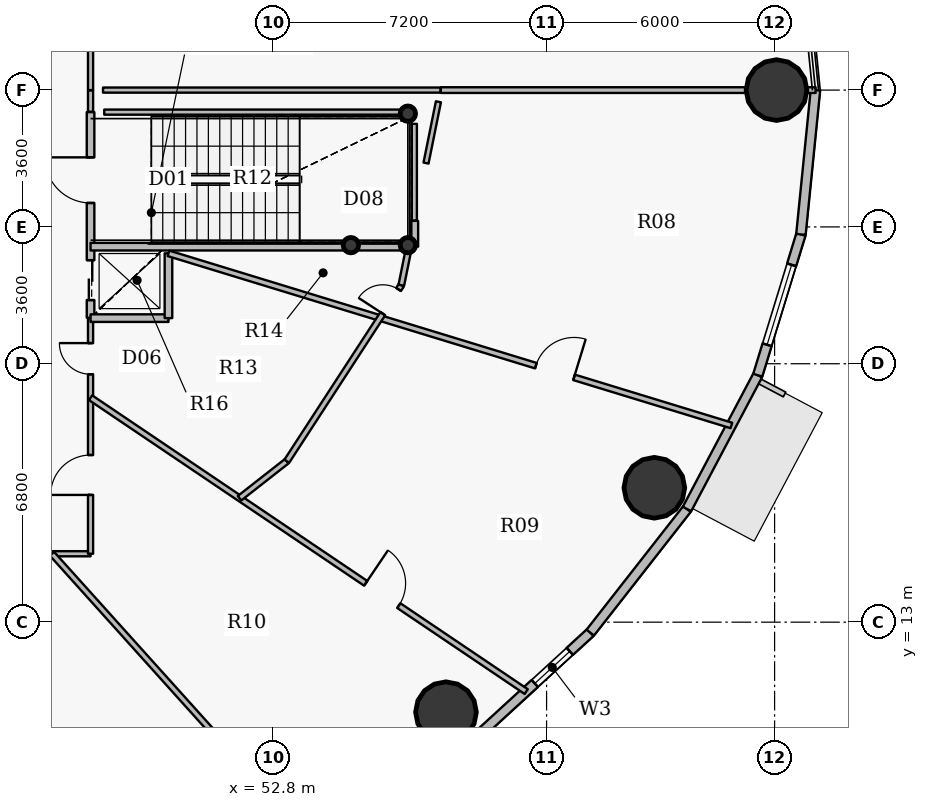
"""IFC4 building model, lengths in metres.
Left out: names, types, materials, properties, quantities, classifications, styles, units other than length and angle.
Written with IfcOpenShell. Run it as: python <this file> out.ifc"""

import sys

from ifc_helpers import new_model, si_unit, direction, frame, frame_2d, origin, origin_2d, place, context, subcontext, project, spatial, rectangle, hollow_circle, extrude, source, transform, mapped, element, fill, save


model = new_model("IFC4")
c1 = context("Model", 3, precision=1e-05, world=origin(), true_north=direction((0.0, 1.0)))
c2 = subcontext(c1, "Body", "Model", "MODEL_VIEW")
j1 = project(units=[si_unit("LENGTHUNIT", "METRE"), si_unit("PLANEANGLEUNIT", "RADIAN")], contexts=[c1])
p1 = place(None, origin())
s1 = spatial("IfcSite", under=j1, at=p1, CompositionType="ELEMENT")
p2 = place(p1, origin())
s2 = spatial("IfcBuilding", under=s1, at=p2, CompositionType="ELEMENT")
p3 = place(p2, frame((0.0, 0.0, 45.0)))
s3 = spatial("IfcBuildingStorey", under=s2, at=p3, CompositionType="ELEMENT", Elevation=45.0)
for number, where, z_axis, x_axis in (
    (1, (56.35, 26.38, 0.0), (0.0, 0.0, 1.0), (1.0, 0.0, 0.0)),
    (2, (56.35, 22.92, 0.0), (0.0, 0.0, 1.0), (1.0, 0.0, 0.0)),
    (3, (54.85, 22.92, 0.0), (0.0, 0.0, 1.0), (1.0, 0.0, 0.0)),
):
    element("IfcColumn", number, at=place(p3, frame(where, z_axis=z_axis, x_axis=x_axis)), inside=s3, PredefinedType="COLUMN", context=c2, shape_type="SweptSolid", body=[
        extrude(hollow_circle(Radius=0.203, WallThickness=0.016, at=origin_2d()), origin(), (0.0, 0.0, 1.0), 4.2),
    ])
for number, where, z_axis, x_axis in (
    (4, (66.05, 27.0, 0.0), (0.0, 0.0, 1.0), (1.0, 0.0, 0.0)),
    (5, (57.353, 10.631, 0.0), (0.0, 0.0, 1.0), (1.0, 0.0, 0.0)),
    (6, (62.835, 16.536, 0.0), (0.0, 0.0, 1.0), (1.0, 0.0, 0.0)),
):
    element("IfcColumn", number, at=place(p3, frame(where, z_axis=z_axis, x_axis=x_axis)), inside=s3, PredefinedType="COLUMN", context=c2, shape_type="SweptSolid", body=[
        extrude(hollow_circle(Radius=0.8, WallThickness=0.045, at=origin_2d()), origin(), (0.0, 0.0, 1.0), 4.2),
    ])
p4 = place(p3, frame((61.15, 12.725, 0.0), z_axis=(0.0, 0.0, 1.0), x_axis=(-0.737116376281, -0.67576582321, 0.0)))
e7 = element("IfcWall", 7, at=p4, inside=s3, PredefinedType="SOLIDWALL", context=c2, shape_type="SweptSolid", body=[
    extrude(rectangle(XDim=4.294, YDim=0.25, at=frame_2d((2.147, 0.0))), origin(), (0.0, 0.0, 1.0), 3.95),
])
p5 = place(p4, frame((0.731, 0.0, 0.9)))
e8 = element("IfcOpeningElement", 8, at=p5, cuts=e7, PredefinedType="OPENING", context=c2, shape_type="SweptSolid", body=[
    extrude(rectangle(XDim=1.25, YDim=1.65, at=origin_2d()), frame((0.625, 0.135, 0.825), z_axis=(0.0, -1.0, 0.0), x_axis=(1.0, 0.0, 0.0)), (0.0, 0.0, 1.0), 0.27),
])
p6 = place(p3, frame((63.695, 15.977, 0.0), z_axis=(0.0, 0.0, 1.0), x_axis=(-0.616295508253, -0.787514981767, 0.0)))
e9 = element("IfcWall", 9, at=p6, inside=s3, PredefinedType="SOLIDWALL", context=c2, shape_type="SweptSolid", body=[
    extrude(rectangle(XDim=4.129, YDim=0.25, at=frame_2d((2.065, 0.0))), origin(), (0.0, 0.0, 1.0), 3.95),
])
p7 = place(p3, frame((65.558, 19.499, 0.0), z_axis=(0.0, 0.0, 1.0), x_axis=(-0.467662443071, -0.883907144072, 0.0)))
e10 = element("IfcWall", 10, at=p7, inside=s3, PredefinedType="SOLIDWALL", context=c2, shape_type="SweptSolid", body=[
    extrude(rectangle(XDim=3.984, YDim=0.25, at=frame_2d((1.992, 0.0))), origin(), (0.0, 0.0, 1.0), 3.95),
])
p8 = place(p3, frame((66.693, 23.203, 0.0), z_axis=(0.0, 0.0, 1.0), x_axis=(-0.293111631758, -0.956078224482, 0.0)))
e11 = element("IfcWall", 11, at=p8, inside=s3, PredefinedType="SOLIDWALL", context=c2, shape_type="SweptSolid", body=[
    extrude(rectangle(XDim=3.875, YDim=0.25, at=frame_2d((1.938, 0.0))), origin(), (0.0, 0.0, 1.0), 3.95),
])
p9 = place(p8, frame((0.837, 0.0, 0.9)))
e12 = element("IfcOpeningElement", 12, at=p9, cuts=e11, PredefinedType="OPENING", context=c2, shape_type="SweptSolid", body=[
    extrude(rectangle(XDim=2.2, YDim=2.0, at=origin_2d()), frame((1.1, 0.135, 1.0), z_axis=(0.0, -1.0, 0.0), x_axis=(1.0, 0.0, 0.0)), (0.0, 0.0, 1.0), 0.27),
])
p10 = place(p3, frame((67.075, 27.0, 0.0), z_axis=(0.0, 0.0, 1.0), x_axis=(-0.099997795174, -0.994987658698, 0.0)))
e13 = element("IfcWall", 13, at=p10, inside=s3, PredefinedType="SOLIDWALL", context=c2, shape_type="SweptSolid", body=[
    extrude(rectangle(XDim=3.816, YDim=0.25, at=frame_2d((1.908, 0.0))), origin(), (0.0, 0.0, 1.0), 3.95),
])
p11 = place(p3, frame((46.05, 14.8, 0.0), z_axis=(0.0, 0.0, 1.0), x_axis=(1.0, 0.0, 0.0)))
e14 = element("IfcWall", 14, at=p11, inside=s3, PredefinedType="PARTITIONING", context=c2, shape_type="SweptSolid", body=[
    extrude(rectangle(XDim=1.95, YDim=0.135, at=frame_2d((0.975, 0.0))), origin(), (0.0, 0.0, 1.0), 3.95),
])
p12 = place(p3, frame((46.985, 14.8, 0.0), z_axis=(0.0, 0.0, 1.0), x_axis=(0.669133664768, -0.743142071662, 0.0)))
e15 = element("IfcWall", 15, at=p12, inside=s3, PredefinedType="PARTITIONING", context=c2, shape_type="SweptSolid", body=[
    extrude(rectangle(XDim=10.299, YDim=0.15, at=frame_2d((5.149, 0.0))), origin(), (0.0, 0.0, 1.0), 3.335),
])
p13 = place(p3, frame((48.0, 14.8, 0.0), z_axis=(0.0, 0.0, 1.0), x_axis=(0.0, 1.0, 0.0)))
e16 = element("IfcWall", 16, at=p13, inside=s3, PredefinedType="PARTITIONING", context=c2, shape_type="SweptSolid", body=[
    extrude(rectangle(XDim=6.2, YDim=0.135, at=frame_2d((3.1, 0.0))), origin(), (0.0, 0.0, 1.0), 3.285),
])
p14 = place(p13, frame((1.548, 0.0, 0.0)))
e17 = element("IfcOpeningElement", 17, at=p14, cuts=e16, PredefinedType="OPENING", context=c2, shape_type="SweptSolid", body=[
    extrude(rectangle(XDim=1.05, YDim=2.15, at=origin_2d()), frame((0.525, 0.078, 1.075), z_axis=(0.0, -1.0, 0.0), x_axis=(1.0, 0.0, 0.0)), (0.0, 0.0, 1.0), 0.155),
])
p15 = place(p13, frame((4.723, 0.0, 0.0)))
e18 = element("IfcOpeningElement", 18, at=p15, cuts=e16, PredefinedType="OPENING", context=c2, shape_type="SweptSolid", body=[
    extrude(rectangle(XDim=0.82, YDim=2.1, at=origin_2d()), frame((0.41, 0.078, 1.05), z_axis=(0.0, -1.0, 0.0), x_axis=(1.0, 0.0, 0.0)), (0.0, 0.0, 1.0), 0.155),
])
p16 = place(p3, frame((48.0, 18.906, 0.0), z_axis=(0.0, 0.0, 1.0), x_axis=(0.829036724814, -0.559194160296, 0.0)))
e19 = element("IfcWall", 19, at=p16, inside=s3, PredefinedType="PARTITIONING", context=c2, shape_type="SweptSolid", body=[
    extrude(rectangle(XDim=13.828, YDim=0.15, at=frame_2d((6.914, 0.0))), origin(), (0.0, 0.0, 1.0), 3.335),
])
p17 = place(p16, frame((8.733, 0.0, 0.0)))
e20 = element("IfcOpeningElement", 20, at=p17, cuts=e19, PredefinedType="OPENING", context=c2, shape_type="SweptSolid", body=[
    extrude(rectangle(XDim=1.05, YDim=2.15, at=origin_2d()), frame((0.525, 0.085, 1.075), z_axis=(0.0, -1.0, 0.0), x_axis=(1.0, 0.0, 0.0)), (0.0, 0.0, 1.0), 0.17),
])
p18 = place(p3, frame((48.0, 21.01, 0.0), z_axis=(0.0, 0.0, 1.0), x_axis=(0.0, 1.0, 0.0)))
e21 = element("IfcWall", 21, at=p18, inside=s3, PredefinedType="PARTITIONING", context=c2, shape_type="SweptSolid", body=[
    extrude(rectangle(XDim=5.41, YDim=0.2, at=frame_2d((2.705, 0.0))), origin(), (0.0, 0.0, 1.0), 3.285),
])
p19 = place(p18, frame((3.02, 0.0, 0.0)))
e22 = element("IfcOpeningElement", 22, at=p19, cuts=e21, PredefinedType="OPENING", context=c2, shape_type="SweptSolid", body=[
    extrude(rectangle(XDim=1.2, YDim=2.15, at=origin_2d()), frame((0.6, 0.11, 1.075), z_axis=(0.0, -1.0, 0.0), x_axis=(1.0, 0.0, 0.0)), (0.0, 0.0, 1.0), 0.22),
])
p20 = place(p18, frame((0.465, 0.0, 0.0)))
e23 = element("IfcOpeningElement", 23, at=p20, cuts=e21, PredefinedType="OPENING", context=c2, shape_type="SweptSolid", body=[
    extrude(rectangle(XDim=1.05, YDim=2.15, at=origin_2d()), frame((0.525, 0.11, 1.075), z_axis=(0.0, -1.0, 0.0), x_axis=(1.0, 0.0, 0.0)), (0.0, 0.0, 1.0), 0.22),
])
p21 = place(p3, frame((48.0, 21.0, 0.0), z_axis=(0.0, 0.0, 1.0), x_axis=(1.0, 0.0, 0.0)))
e24 = element("IfcWall", 24, at=p21, inside=s3, PredefinedType="PARTITIONING", context=c2, shape_type="SweptSolid", body=[
    extrude(rectangle(XDim=2.05, YDim=0.2, at=frame_2d((1.025, 0.0))), origin(), (0.0, 0.0, 1.0), 3.95),
])
p22 = place(p3, frame((48.0, 22.88, 0.0), z_axis=(0.0, 0.0, 1.0), x_axis=(1.0, 0.0, 0.0)))
e25 = element("IfcWall", 25, at=p22, inside=s3, PredefinedType="PARTITIONING", context=c2, shape_type="SweptSolid", body=[
    extrude(rectangle(XDim=8.383, YDim=0.2, at=frame_2d((4.191, 0.0))), origin(), (0.0, 0.0, 1.0), 3.95),
])
p23 = place(p3, frame((48.0, 27.0, 0.0), z_axis=(0.0, 0.0, 1.0), x_axis=(0.0, 1.0, 0.0)))
e26 = element("IfcWall", 26, at=p23, inside=s3, PredefinedType="PARTITIONING", context=c2, shape_type="SweptSolid", body=[
    extrude(rectangle(XDim=14.2, YDim=0.135, at=frame_2d((7.1, 0.0))), origin(), (0.0, 0.0, 1.0), 3.285),
])
p24 = place(p23, frame((2.959, 0.0, 0.0)))
e27 = element("IfcOpeningElement", 27, at=p24, cuts=e26, PredefinedType="OPENING", context=c2, shape_type="SweptSolid", body=[
    extrude(rectangle(XDim=1.05, YDim=2.15, at=origin_2d()), frame((0.525, 0.078, 1.075), z_axis=(0.0, -1.0, 0.0), x_axis=(1.0, 0.0, 0.0)), (0.0, 0.0, 1.0), 0.155),
])
p25 = place(p23, frame((10.019, 0.0, 0.0)))
e28 = element("IfcOpeningElement", 28, at=p25, cuts=e26, PredefinedType="OPENING", context=c2, shape_type="SweptSolid", body=[
    extrude(rectangle(XDim=1.05, YDim=2.15, at=origin_2d()), frame((0.525, 0.078, 1.075), z_axis=(0.0, -1.0, 0.0), x_axis=(1.0, 0.0, 0.0)), (0.0, 0.0, 1.0), 0.155),
])
p26 = place(p3, frame((50.05, 21.0, 0.0), z_axis=(0.0, 0.0, 1.0), x_axis=(0.0, 1.0, 0.0)))
e29 = element("IfcWall", 29, at=p26, inside=s3, PredefinedType="PARTITIONING", context=c2, shape_type="SweptSolid", body=[
    extrude(rectangle(XDim=1.705, YDim=0.2, at=frame_2d((0.852, 0.0))), origin(), (0.0, 0.0, 1.0), 3.285),
])
p27 = place(p3, frame((50.05, 22.705, 0.0), z_axis=(0.0, 0.0, 1.0), x_axis=(0.9563012706, -0.292383104588, 0.0)))
e30 = element("IfcWall", 30, at=p27, inside=s3, PredefinedType="PARTITIONING", context=c2, shape_type="SweptSolid", body=[
    extrude(rectangle(XDim=15.49, YDim=0.15, at=frame_2d((7.745, 0.0))), origin(), (0.0, 0.0, 1.0), 3.335),
])
p28 = place(p27, frame((10.11, 0.0, 0.0)))
e31 = element("IfcOpeningElement", 31, at=p28, cuts=e30, PredefinedType="OPENING", context=c2, shape_type="SweptSolid", body=[
    extrude(rectangle(XDim=1.05, YDim=2.15, at=origin_2d()), frame((0.525, 0.085, 1.075), z_axis=(0.0, -1.0, 0.0), x_axis=(1.0, 0.0, 0.0)), (0.0, 0.0, 1.0), 0.17),
])
p29 = place(p3, frame((51.92, 16.262, 0.0), z_axis=(0.0, 0.0, 1.0), x_axis=(0.787325584525, 0.616537447324, 0.0)))
e32 = element("IfcWall", 32, at=p29, inside=s3, PredefinedType="PARTITIONING", context=c2, shape_type="SweptSolid", body=[
    extrude(rectangle(XDim=1.58, YDim=0.15, at=frame_2d((0.79, 0.0))), origin(), (0.0, 0.0, 1.0), 3.95),
])
p30 = place(p3, frame((53.164, 17.236, 0.0), z_axis=(0.0, 0.0, 1.0), x_axis=(0.545448002944, 0.838144662981, 0.0)))
e33 = element("IfcWall", 33, at=p30, inside=s3, PredefinedType="PARTITIONING", context=c2, shape_type="SweptSolid", body=[
    extrude(rectangle(XDim=5.525, YDim=0.15, at=frame_2d((2.763, 0.0))), origin(), (0.0, 0.0, 1.0), 3.285),
])
p31 = place(p30, frame((4.631, 0.0, 0.0)))
e34 = element("IfcOpeningElement", 34, at=p31, cuts=e33, PredefinedType="OPENING", context=c2, shape_type="SweptSolid", body=[
    extrude(rectangle(XDim=0.76, YDim=2.1, at=origin_2d()), frame((0.38, 0.085, 1.05), z_axis=(0.0, -1.0, 0.0), x_axis=(1.0, 0.0, 0.0)), (0.0, 0.0, 1.0), 0.17),
])
p32 = place(p3, frame((56.178, 21.866, 0.0), z_axis=(0.0, 0.0, 1.0), x_axis=(0.198113758035, 0.980179034094, 0.0)))
e35 = element("IfcWall", 35, at=p32, inside=s3, PredefinedType="PARTITIONING", context=c2, shape_type="SweptSolid", body=[
    extrude(rectangle(XDim=1.034, YDim=0.15, at=frame_2d((0.517, 0.0))), origin(), (0.0, 0.0, 1.0), 3.95),
])
p33 = place(p3, frame((56.52, 22.88, 0.0), z_axis=(0.0, 0.0, 1.0), x_axis=(0.0, 1.0, 0.0)))
e36 = element("IfcWall", 36, at=p33, inside=s3, PredefinedType="PARTITIONING", context=c2, shape_type="SweptSolid", body=[
    extrude(rectangle(XDim=0.679, YDim=0.2, at=frame_2d((0.34, 0.0))), origin(), (0.0, 0.0, 1.0), 3.95),
])
p34 = place(p3, frame((57.216, 27.0, 0.0), z_axis=(0.0, 0.0, 1.0), x_axis=(1.0, 0.0, 0.0)))
e37 = element("IfcWall", 37, at=p34, inside=s3, PredefinedType="PARTITIONING", context=c2, shape_type="SweptSolid", body=[
    extrude(rectangle(XDim=9.864, YDim=0.15, at=frame_2d((4.932, 0.0))), origin(), (0.0, 0.0, 1.0), 3.285),
])
p35 = place(p3, frame((48.36, 26.42, 0.0), z_axis=(0.0, 0.0, 1.0), x_axis=(1.0, 0.0, 0.0)))
e38 = element("IfcWall", 38, at=p35, inside=s3, PredefinedType="PARTITIONING", context=c2, shape_type="SweptSolid", body=[
    extrude(rectangle(XDim=8.16, YDim=0.135, at=frame_2d((4.08, 0.0))), origin(), (0.0, 0.0, 1.0), 3.95),
])
p36 = place(p3, frame((56.52, 26.113, 0.0), z_axis=(0.0, 0.0, 1.0), x_axis=(0.0, -1.0, 0.0)))
e39 = element("IfcWall", 39, at=p36, inside=s3, PredefinedType="PARTITIONING", context=c2, shape_type="SweptSolid", body=[
    extrude(rectangle(XDim=2.543, YDim=0.135, at=frame_2d((1.272, 0.0))), origin(), (0.0, 0.0, 1.0), 3.95),
])
p37 = place(p3, frame((48.0, 26.99, 0.0), z_axis=(0.0, 0.0, 1.0), x_axis=(0.0, -1.0, 0.0)))
e40 = element("IfcWall", 40, at=p37, inside=s3, PredefinedType="PARTITIONING", context=c2, shape_type="SweptSolid", body=[
    extrude(rectangle(XDim=0.56, YDim=0.135, at=frame_2d((0.28, 0.0))), origin(), (0.0, 0.0, 1.0), 3.285),
])
p38 = place(p3, frame((57.206, 27.0, 0.0), z_axis=(0.0, 0.0, 1.0), x_axis=(-1.0, 0.0, 0.0)))
e41 = element("IfcWall", 41, at=p38, inside=s3, PredefinedType="PARTITIONING", context=c2, shape_type="SweptSolid", body=[
    extrude(rectangle(XDim=8.879, YDim=0.135, at=frame_2d((4.439, 0.0))), origin(), (0.0, 0.0, 1.0), 3.285),
])
p39 = place(p3, frame((56.827, 25.079, 0.0), z_axis=(0.0, 0.0, 1.0), x_axis=(0.198340845342, 0.980133107832, 0.0)))
e42 = element("IfcWall", 42, at=p39, inside=s3, PredefinedType="PARTITIONING", context=c2, shape_type="SweptSolid", body=[
    extrude(rectangle(XDim=1.646, YDim=0.135, at=frame_2d((0.823, 0.0))), origin(), (0.0, 0.0, 1.0), 3.95),
])
m1 = source(origin(), c2, "Body", "SweptSolid", [
    extrude(rectangle(XDim=1.25, YDim=1.65, at=origin_2d()), frame((0.625, 0.03, 0.825), z_axis=(0.0, -1.0, 0.0), x_axis=(1.0, 0.0, 0.0)), (0.0, 0.0, 1.0), 0.06),
])
p40 = place(p5, origin())
e43 = element("IfcWindow", 43, at=p40, inside=s3, PartitioningType="SINGLE_PANEL", PredefinedType="WINDOW", context=c2, shape_type="MappedRepresentation", body=[
    mapped(m1, transform((0.0, 0.0, 0.0), x_axis=(1.0, 0.0, 0.0), y_axis=(0.0, 1.0, 0.0), z_axis=(0.0, 0.0, 1.0), scale=1.0)),
])
fill(e8, e43)
m2 = source(origin(), c2, "Body", "SweptSolid", [
    extrude(rectangle(XDim=2.2, YDim=2.0, at=origin_2d()), frame((1.1, 0.03, 1.0), z_axis=(0.0, -1.0, 0.0), x_axis=(1.0, 0.0, 0.0)), (0.0, 0.0, 1.0), 0.06),
])
p41 = place(p9, origin())
e44 = element("IfcWindow", 44, at=p41, inside=s3, PartitioningType="TRIPLE_PANEL_VERTICAL", PredefinedType="WINDOW", context=c2, shape_type="MappedRepresentation", body=[
    mapped(m2, transform((0.0, 0.0, 0.0), x_axis=(1.0, 0.0, 0.0), y_axis=(0.0, 1.0, 0.0), z_axis=(0.0, 0.0, 1.0), scale=1.0)),
])
fill(e12, e44)
m3 = source(origin(), c2, "Body", "SweptSolid", [
    extrude(rectangle(XDim=1.2, YDim=2.15, at=origin_2d()), frame((0.6, 0.025, 1.075), z_axis=(0.0, -1.0, 0.0), x_axis=(1.0, 0.0, 0.0)), (0.0, 0.0, 1.0), 0.05),
])
p42 = place(p19, origin())
e45 = element("IfcDoor", 45, at=p42, inside=s3, OperationType="SINGLE_SWING_RIGHT", PredefinedType="DOOR", context=c2, shape_type="MappedRepresentation", body=[
    mapped(m3, transform((0.0, 0.0, 0.0), x_axis=(1.0, 0.0, 0.0), y_axis=(0.0, 1.0, 0.0), z_axis=(0.0, 0.0, 1.0), scale=1.0)),
])
fill(e22, e45)
m4 = source(origin(), c2, "Body", "SweptSolid", [
    extrude(rectangle(XDim=1.05, YDim=2.15, at=origin_2d()), frame((0.525, 0.025, 1.075), z_axis=(0.0, -1.0, 0.0), x_axis=(1.0, 0.0, 0.0)), (0.0, 0.0, 1.0), 0.05),
])
p43 = place(p20, origin())
e46 = element("IfcDoor", 46, at=p43, inside=s3, OperationType="DOUBLE_DOOR_SLIDING", PredefinedType="USERDEFINED", context=c2, shape_type="MappedRepresentation", body=[
    mapped(m4, transform((0.0, 0.0, 0.0), x_axis=(1.0, 0.0, 0.0), y_axis=(0.0, 1.0, 0.0), z_axis=(0.0, 0.0, 1.0), scale=1.0)),
])
fill(e23, e46)
m5 = source(origin(), c2, "Body", "SweptSolid", [
    extrude(rectangle(XDim=1.05, YDim=2.15, at=origin_2d()), frame((0.525, 0.025, 1.075), z_axis=(0.0, -1.0, 0.0), x_axis=(1.0, 0.0, 0.0)), (0.0, 0.0, 1.0), 0.05),
])
p44 = place(p14, origin())
e47 = element("IfcDoor", 47, at=p44, inside=s3, OperationType="SINGLE_SWING_LEFT", PredefinedType="DOOR", context=c2, shape_type="MappedRepresentation", body=[
    mapped(m5, transform((0.0, 0.0, 0.0), x_axis=(1.0, 0.0, 0.0), y_axis=(0.0, 1.0, 0.0), z_axis=(0.0, 0.0, 1.0), scale=1.0)),
])
fill(e17, e47)
m6 = source(origin(), c2, "Body", "SweptSolid", [
    extrude(rectangle(XDim=0.82, YDim=2.1, at=origin_2d()), frame((0.41, 0.025, 1.05), z_axis=(0.0, -1.0, 0.0), x_axis=(1.0, 0.0, 0.0)), (0.0, 0.0, 1.0), 0.05),
])
p45 = place(p15, origin())
e48 = element("IfcDoor", 48, at=p45, inside=s3, OperationType="SINGLE_SWING_RIGHT", PredefinedType="DOOR", context=c2, shape_type="MappedRepresentation", body=[
    mapped(m6, transform((0.0, 0.0, 0.0), x_axis=(1.0, 0.0, 0.0), y_axis=(0.0, 1.0, 0.0), z_axis=(0.0, 0.0, 1.0), scale=1.0)),
])
fill(e18, e48)
p46 = place(p17, origin())
e49 = element("IfcDoor", 49, at=p46, inside=s3, OperationType="SINGLE_SWING_LEFT", PredefinedType="DOOR", context=c2, shape_type="MappedRepresentation", body=[
    mapped(m5, transform((0.0, 0.0, 0.0), x_axis=(1.0, 0.0, 0.0), y_axis=(0.0, 1.0, 0.0), z_axis=(0.0, 0.0, 1.0), scale=1.0)),
])
fill(e20, e49)
p47 = place(p28, origin())
e50 = element("IfcDoor", 50, at=p47, inside=s3, OperationType="SINGLE_SWING_RIGHT", PredefinedType="DOOR", context=c2, shape_type="MappedRepresentation", body=[
    mapped(m5, transform((0.0, 0.0, 0.0), x_axis=(1.0, 0.0, 0.0), y_axis=(0.0, 1.0, 0.0), z_axis=(0.0, 0.0, 1.0), scale=1.0)),
])
fill(e31, e50)
m7 = source(origin(), c2, "Body", "SweptSolid", [
    extrude(rectangle(XDim=0.76, YDim=2.1, at=origin_2d()), frame((0.38, 0.025, 1.05), z_axis=(0.0, -1.0, 0.0), x_axis=(1.0, 0.0, 0.0)), (0.0, 0.0, 1.0), 0.05),
])
p48 = place(p31, origin())
e51 = element("IfcDoor", 51, at=p48, inside=s3, OperationType="SINGLE_SWING_LEFT", PredefinedType="DOOR", context=c2, shape_type="MappedRepresentation", body=[
    mapped(m7, transform((0.0, 0.0, 0.0), x_axis=(1.0, 0.0, 0.0), y_axis=(0.0, 1.0, 0.0), z_axis=(0.0, 0.0, 1.0), scale=1.0)),
])
fill(e34, e51)
save(model, sys.argv[1])
